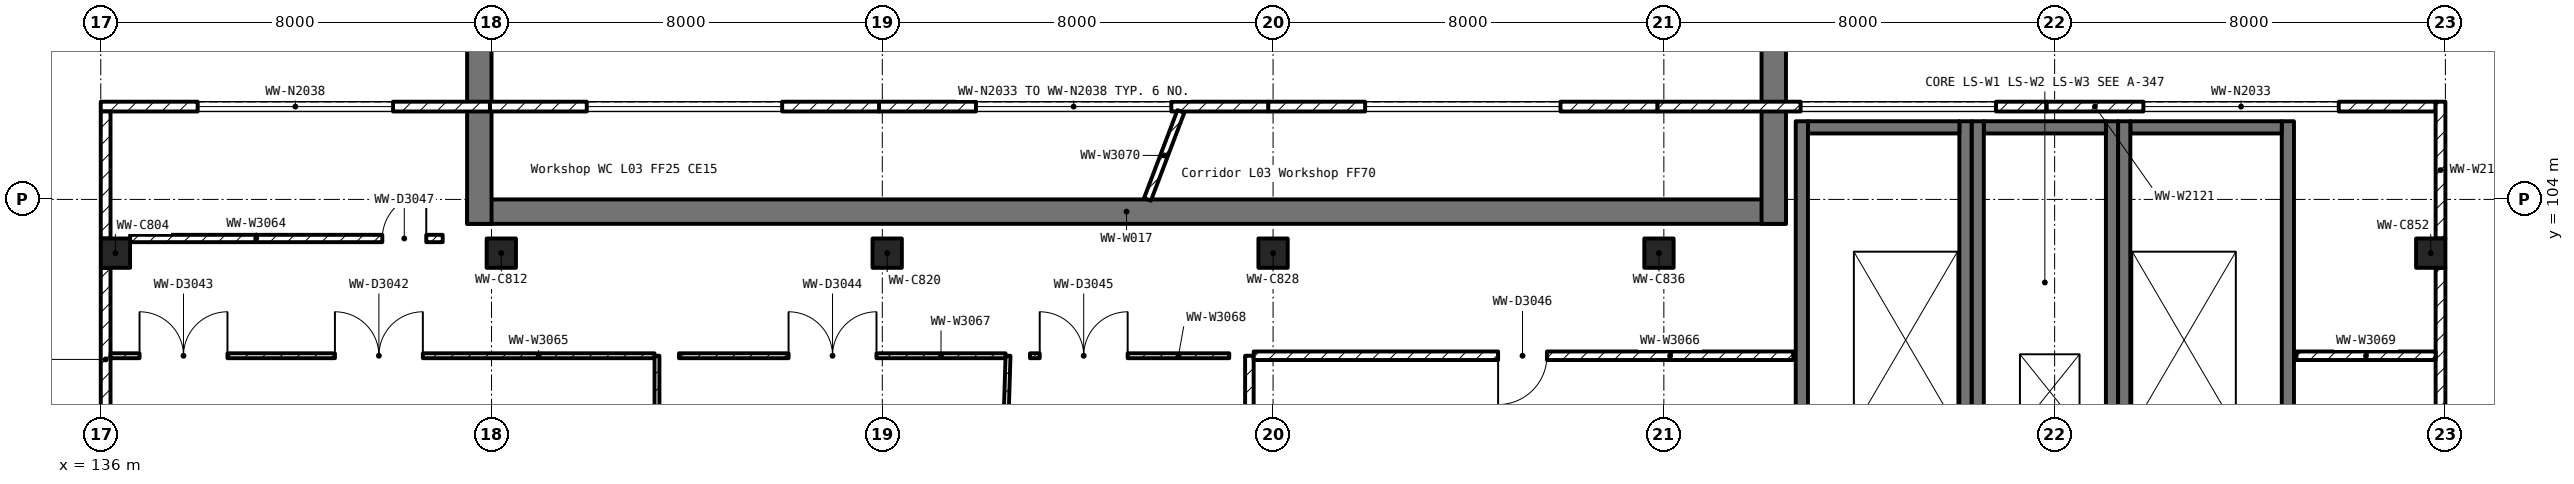
"""IFC4 building model, lengths in metres.
Left out: names, types, materials, properties, quantities, classifications, styles, units other than length and angle.
Written with IfcOpenShell. Run it as: python <this file> out.ifc"""

import sys

from ifc_helpers import new_model, si_unit, direction, frame, frame_2d, origin, origin_2d, place, context, subcontext, project, spatial, rectangle, extrude, element, fill, save


model = new_model("IFC4")
c1 = context("Model", 3, precision=1e-05, world=origin(), true_north=direction((0.0, 1.0)))
c2 = subcontext(c1, "Body", "Model", "MODEL_VIEW")
j1 = project(units=[si_unit("LENGTHUNIT", "METRE"), si_unit("PLANEANGLEUNIT", "RADIAN")], contexts=[c1])
p1 = place(None, origin())
s1 = spatial("IfcSite", under=j1, at=p1, CompositionType="ELEMENT")
p2 = place(p1, origin())
s2 = spatial("IfcBuilding", under=s1, at=p2, CompositionType="ELEMENT")
p3 = place(p2, frame((0.0, 0.0, 17.0)))
s3 = spatial("IfcBuildingStorey", under=s2, at=p3, CompositionType="ELEMENT", Elevation=17.0)
for number, where, z_axis, x_axis in (
    (1, (136.3, 102.9, 0.0), (0.0, 0.0, 1.0), (1.0, 0.0, 0.0)),
    (2, (144.2, 102.9, 0.0), (0.0, 0.0, 1.0), (1.0, 0.0, 0.0)),
    (3, (152.1, 102.9, 0.0), (0.0, 0.0, 1.0), (1.0, 0.0, 0.0)),
    (4, (160.0, 102.9, 0.0), (0.0, 0.0, 1.0), (1.0, 0.0, 0.0)),
    (5, (167.9, 102.9, 0.0), (0.0, 0.0, 1.0), (1.0, 0.0, 0.0)),
    (6, (183.7, 102.9, 0.0), (0.0, 0.0, 1.0), (1.0, 0.0, 0.0)),
):
    element("IfcColumn", number, at=place(p3, frame(where, z_axis=z_axis, x_axis=x_axis)), inside=s3, PredefinedType="COLUMN", context=c2, shape_type="SweptSolid", body=[
        extrude(rectangle(XDim=0.6, YDim=0.6, at=origin_2d()), origin(), (0.0, 0.0, 1.0), 5.5),
    ])
p4 = place(p3, frame((143.5, 103.75, 0.0), z_axis=(0.0, 0.0, 1.0), x_axis=(1.0, 0.0, 0.0)))
e7 = element("IfcWall", 7, at=p4, inside=s3, PredefinedType="SHEAR", context=c2, shape_type="SweptSolid", body=[
    extrude(rectangle(XDim=27.0, YDim=0.5, at=frame_2d((13.5, 0.0))), origin(), (0.0, 0.0, 1.0), 5.5),
])
for number, where, z_axis, x_axis in (
    (8, (143.75, 103.5, 0.0), (0.0, 0.0, 1.0), (0.0, 1.0, 0.0)),
    (9, (170.25, 103.5, 0.0), (0.0, 0.0, 1.0), (0.0, 1.0, 0.0)),
):
    element("IfcWall", number, at=place(p3, frame(where, z_axis=z_axis, x_axis=x_axis)), inside=s3, PredefinedType="SHEAR", context=c2, shape_type="SweptSolid", body=[
        extrude(rectangle(XDim=25.0, YDim=0.5, at=frame_2d((12.5, 0.0))), origin(), (0.0, 0.0, 1.0), 5.5),
    ])
p5 = place(p3, frame((183.8, 105.9, 0.0), z_axis=(0.0, 0.0, 1.0), x_axis=(-1.0, 0.0, 0.0)))
e10 = element("IfcWall", 10, at=p5, inside=s3, PredefinedType="SOLIDWALL", context=c2, shape_type="SweptSolid", body=[
    extrude(rectangle(XDim=7.967, YDim=0.2, at=frame_2d((3.983, 0.0))), origin(), (0.0, 0.0, 1.0), 5.25),
])
p6 = place(p5, frame((1.983, 0.0, 1.0)))
e11 = element("IfcOpeningElement", 11, at=p6, cuts=e10, PredefinedType="OPENING", context=c2, shape_type="SweptSolid", body=[
    extrude(rectangle(XDim=4.0, YDim=1.8, at=frame_2d((2.0, 0.9))), frame((0.0, 0.112, 0.0), z_axis=(0.0, -1.0, 0.0), x_axis=(1.0, 0.0, 0.0)), (0.0, 0.0, 1.0), 0.224),
])
p7 = place(p3, frame((175.833, 105.9, 0.0), z_axis=(0.0, 0.0, 1.0), x_axis=(-1.0, 0.0, 0.0)))
e12 = element("IfcWall", 12, at=p7, inside=s3, PredefinedType="SOLIDWALL", context=c2, shape_type="SweptSolid", body=[
    extrude(rectangle(XDim=7.966, YDim=0.2, at=frame_2d((3.983, 0.0))), origin(), (0.0, 0.0, 1.0), 5.25),
])
p8 = place(p7, frame((1.033, 0.0, 1.0)))
e13 = element("IfcOpeningElement", 13, at=p8, cuts=e12, PredefinedType="OPENING", context=c2, shape_type="SweptSolid", body=[
    extrude(rectangle(XDim=4.0, YDim=1.8, at=frame_2d((2.0, 0.9))), frame((0.0, 0.112, 0.0), z_axis=(0.0, -1.0, 0.0), x_axis=(1.0, 0.0, 0.0)), (0.0, 0.0, 1.0), 0.224),
])
p9 = place(p3, frame((167.867, 105.9, 0.0), z_axis=(0.0, 0.0, 1.0), x_axis=(-1.0, 0.0, 0.0)))
e14 = element("IfcWall", 14, at=p9, inside=s3, PredefinedType="SOLIDWALL", context=c2, shape_type="SweptSolid", body=[
    extrude(rectangle(XDim=7.967, YDim=0.2, at=frame_2d((3.983, 0.0))), origin(), (0.0, 0.0, 1.0), 4.9),
])
p10 = place(p9, frame((1.983, 0.0, 1.0)))
e15 = element("IfcOpeningElement", 15, at=p10, cuts=e14, PredefinedType="OPENING", context=c2, shape_type="SweptSolid", body=[
    extrude(rectangle(XDim=4.0, YDim=1.8, at=frame_2d((2.0, 0.9))), frame((0.0, 0.112, 0.0), z_axis=(0.0, -1.0, 0.0), x_axis=(1.0, 0.0, 0.0)), (0.0, 0.0, 1.0), 0.224),
])
p11 = place(p3, frame((159.9, 105.9, 0.0), z_axis=(0.0, 0.0, 1.0), x_axis=(-1.0, 0.0, 0.0)))
e16 = element("IfcWall", 16, at=p11, inside=s3, PredefinedType="SOLIDWALL", context=c2, shape_type="SweptSolid", body=[
    extrude(rectangle(XDim=7.967, YDim=0.2, at=frame_2d((3.983, 0.0))), origin(), (0.0, 0.0, 1.0), 4.9),
])
p12 = place(p11, frame((1.983, 0.0, 1.0)))
e17 = element("IfcOpeningElement", 17, at=p12, cuts=e16, PredefinedType="OPENING", context=c2, shape_type="SweptSolid", body=[
    extrude(rectangle(XDim=4.0, YDim=1.8, at=frame_2d((2.0, 0.9))), frame((0.0, 0.112, 0.0), z_axis=(0.0, -1.0, 0.0), x_axis=(1.0, 0.0, 0.0)), (0.0, 0.0, 1.0), 0.224),
])
p13 = place(p3, frame((151.933, 105.9, 0.0), z_axis=(0.0, 0.0, 1.0), x_axis=(-1.0, 0.0, 0.0)))
e18 = element("IfcWall", 18, at=p13, inside=s3, PredefinedType="SOLIDWALL", context=c2, shape_type="SweptSolid", body=[
    extrude(rectangle(XDim=7.966, YDim=0.2, at=frame_2d((3.983, 0.0))), origin(), (0.0, 0.0, 1.0), 4.9),
])
p14 = place(p13, frame((1.983, 0.0, 1.0)))
e19 = element("IfcOpeningElement", 19, at=p14, cuts=e18, PredefinedType="OPENING", context=c2, shape_type="SweptSolid", body=[
    extrude(rectangle(XDim=4.0, YDim=1.8, at=frame_2d((2.0, 0.9))), frame((0.0, 0.112, 0.0), z_axis=(0.0, -1.0, 0.0), x_axis=(1.0, 0.0, 0.0)), (0.0, 0.0, 1.0), 0.224),
])
p15 = place(p3, frame((143.967, 105.9, 0.0), z_axis=(0.0, 0.0, 1.0), x_axis=(-1.0, 0.0, 0.0)))
e20 = element("IfcWall", 20, at=p15, inside=s3, PredefinedType="SOLIDWALL", context=c2, shape_type="SweptSolid", body=[
    extrude(rectangle(XDim=7.967, YDim=0.2, at=frame_2d((3.983, 0.0))), origin(), (0.0, 0.0, 1.0), 5.25),
])
p16 = place(p15, frame((1.983, 0.0, 1.0)))
e21 = element("IfcOpeningElement", 21, at=p16, cuts=e20, PredefinedType="OPENING", context=c2, shape_type="SweptSolid", body=[
    extrude(rectangle(XDim=4.0, YDim=1.8, at=frame_2d((2.0, 0.9))), frame((0.0, 0.112, 0.0), z_axis=(0.0, -1.0, 0.0), x_axis=(1.0, 0.0, 0.0)), (0.0, 0.0, 1.0), 0.224),
])
p17 = place(p3, frame((136.1, 105.8, 0.0), z_axis=(0.0, 0.0, 1.0), x_axis=(0.0, -1.0, 0.0)))
e22 = element("IfcWall", 22, at=p17, inside=s3, PredefinedType="SOLIDWALL", context=c2, shape_type="SweptSolid", body=[
    extrude(rectangle(XDim=2.6, YDim=0.2, at=frame_2d((1.3, 0.0))), origin(), (0.0, 0.0, 1.0), 4.45),
])
p18 = place(p3, frame((136.1, 102.6, 0.0), z_axis=(0.0, 0.0, 1.0), x_axis=(0.0, -1.0, 0.0)))
e23 = element("IfcWall", 23, at=p18, inside=s3, PredefinedType="SOLIDWALL", context=c2, shape_type="SweptSolid", body=[
    extrude(rectangle(XDim=3.75, YDim=0.2, at=frame_2d((1.875, 0.0))), origin(), (0.0, 0.0, 1.0), 4.45),
])
p19 = place(p3, frame((183.9, 99.05, 0.0), z_axis=(0.0, 0.0, 1.0), x_axis=(0.0, 1.0, 0.0)))
e24 = element("IfcWall", 24, at=p19, inside=s3, PredefinedType="SOLIDWALL", context=c2, shape_type="SweptSolid", body=[
    extrude(rectangle(XDim=3.55, YDim=0.2, at=frame_2d((1.775, 0.0))), origin(), (0.0, 0.0, 1.0), 4.45),
])
p20 = place(p3, frame((183.9, 103.2, 0.0), z_axis=(0.0, 0.0, 1.0), x_axis=(0.0, 1.0, 0.0)))
e25 = element("IfcWall", 25, at=p20, inside=s3, PredefinedType="SOLIDWALL", context=c2, shape_type="SweptSolid", body=[
    extrude(rectangle(XDim=2.8, YDim=0.2, at=frame_2d((1.4, 0.0))), origin(), (0.0, 0.0, 1.0), 4.45),
])
for number, where, z_axis, x_axis in (
    (26, (183.85, 106.32, 0.0), (0.0, 0.0, 1.0), (0.0, 1.0, 0.0)),
    (27, (136.15, 113.44, 0.0), (0.0, 0.0, 1.0), (0.0, -1.0, 0.0)),
):
    element("IfcWall", number, at=place(p3, frame(where, z_axis=z_axis, x_axis=x_axis)), inside=s3, PredefinedType="PARAPET", context=c2, shape_type="SweptSolid", body=[
        extrude(rectangle(XDim=7.42, YDim=0.3, at=frame_2d((3.71, 0.0))), origin(), (0.0, 0.0, 1.0), 1.1),
    ])
p21 = place(p3, frame((177.175, 99.0, 0.0), z_axis=(0.0, 0.0, 1.0), x_axis=(0.0, 1.0, 0.0)))
e28 = element("IfcWall", 28, at=p21, inside=s3, PredefinedType="SOLIDWALL", context=c2, shape_type="SweptSolid", body=[
    extrude(rectangle(XDim=6.6, YDim=0.25, at=frame_2d((3.3, 0.0))), origin(), (0.0, 0.0, 1.0), 5.25),
])
p22 = place(p3, frame((177.05, 105.475, 0.0), z_axis=(0.0, 0.0, 1.0), x_axis=(-1.0, 0.0, 0.0)))
e29 = element("IfcWall", 29, at=p22, inside=s3, PredefinedType="SOLIDWALL", context=c2, shape_type="SweptSolid", body=[
    extrude(rectangle(XDim=2.5, YDim=0.25, at=frame_2d((1.25, 0.0))), origin(), (0.0, 0.0, 1.0), 5.25),
])
for number, where, z_axis, x_axis in (
    (30, (174.425, 105.6, 0.0), (0.0, 0.0, 1.0), (0.0, -1.0, 0.0)),
    (31, (174.175, 99.0, 0.0), (0.0, 0.0, 1.0), (0.0, 1.0, 0.0)),
):
    element("IfcWall", number, at=place(p3, frame(where, z_axis=z_axis, x_axis=x_axis)), inside=s3, PredefinedType="SOLIDWALL", context=c2, shape_type="SweptSolid", body=[
        extrude(rectangle(XDim=6.6, YDim=0.25, at=frame_2d((3.3, 0.0))), origin(), (0.0, 0.0, 1.0), 5.25),
    ])
p23 = place(p3, frame((174.05, 105.475, 0.0), z_axis=(0.0, 0.0, 1.0), x_axis=(-1.0, 0.0, 0.0)))
e32 = element("IfcWall", 32, at=p23, inside=s3, PredefinedType="SOLIDWALL", context=c2, shape_type="SweptSolid", body=[
    extrude(rectangle(XDim=3.1, YDim=0.25, at=frame_2d((1.55, 0.0))), origin(), (0.0, 0.0, 1.0), 5.25),
])
for number, where, z_axis, x_axis in (
    (33, (170.825, 105.6, 0.0), (0.0, 0.0, 1.0), (0.0, -1.0, 0.0)),
    (34, (180.775, 99.0, 0.0), (0.0, 0.0, 1.0), (0.0, 1.0, 0.0)),
):
    element("IfcWall", number, at=place(p3, frame(where, z_axis=z_axis, x_axis=x_axis)), inside=s3, PredefinedType="SOLIDWALL", context=c2, shape_type="SweptSolid", body=[
        extrude(rectangle(XDim=6.6, YDim=0.25, at=frame_2d((3.3, 0.0))), origin(), (0.0, 0.0, 1.0), 5.25),
    ])
p24 = place(p3, frame((180.65, 105.475, 0.0), z_axis=(0.0, 0.0, 1.0), x_axis=(-1.0, 0.0, 0.0)))
e35 = element("IfcWall", 35, at=p24, inside=s3, PredefinedType="SOLIDWALL", context=c2, shape_type="SweptSolid", body=[
    extrude(rectangle(XDim=3.1, YDim=0.25, at=frame_2d((1.55, 0.0))), origin(), (0.0, 0.0, 1.0), 5.25),
])
p25 = place(p3, frame((177.425, 105.6, 0.0), z_axis=(0.0, 0.0, 1.0), x_axis=(0.0, -1.0, 0.0)))
e36 = element("IfcWall", 36, at=p25, inside=s3, PredefinedType="SOLIDWALL", context=c2, shape_type="SweptSolid", body=[
    extrude(rectangle(XDim=6.6, YDim=0.25, at=frame_2d((3.3, 0.0))), origin(), (0.0, 0.0, 1.0), 5.25),
])
p26 = place(p3, frame((147.387, 100.8, 0.0), z_axis=(0.0, 0.0, 1.0), x_axis=(0.0, -1.0, 0.0)))
e37 = element("IfcWall", 37, at=p26, inside=s3, PredefinedType="PARTITIONING", context=c2, shape_type="SweptSolid", body=[
    extrude(rectangle(XDim=22.6, YDim=0.1, at=frame_2d((11.3, 0.0))), origin(), (0.0, 0.0, 1.0), 4.35),
])
p27 = place(p3, frame((154.574, 100.8, 0.0), z_axis=(0.0, 0.0, 1.0), x_axis=(-0.030697419898, -0.999528723155, 0.0)))
e38 = element("IfcWall", 38, at=p27, inside=s3, PredefinedType="PARTITIONING", context=c2, shape_type="SweptSolid", body=[
    extrude(rectangle(XDim=22.611, YDim=0.1, at=frame_2d((11.305, 0.0))), origin(), (0.0, 0.0, 1.0), 4.35),
])
p28 = place(p3, frame((159.515, 100.8, 0.0), z_axis=(0.0, 0.0, 1.0), x_axis=(0.0, -1.0, 0.0)))
e39 = element("IfcWall", 39, at=p28, inside=s3, PredefinedType="PARTITIONING", context=c2, shape_type="SweptSolid", body=[
    extrude(rectangle(XDim=22.6, YDim=0.175, at=frame_2d((11.3, 0.0))), origin(), (0.0, 0.0, 1.0), 4.35),
])
p29 = place(p3, frame((136.601, 103.2, 0.0), z_axis=(0.0, 0.0, 1.0), x_axis=(1.0, 0.0, 0.0)))
e40 = element("IfcWall", 40, at=p29, inside=s3, PredefinedType="PARTITIONING", context=c2, shape_type="SweptSolid", body=[
    extrude(rectangle(XDim=6.399, YDim=0.15, at=frame_2d((3.199, 0.0))), origin(), (0.0, 0.0, 1.0), 4.0),
])
p30 = place(p29, frame((5.163, 0.0, 0.0)))
e41 = element("IfcOpeningElement", 41, at=p30, cuts=e40, PredefinedType="OPENING", context=c2, shape_type="SweptSolid", body=[
    extrude(rectangle(XDim=0.9, YDim=2.1, at=frame_2d((0.45, 1.05))), frame((0.0, 0.087, 0.0), z_axis=(0.0, -1.0, 0.0), x_axis=(1.0, 0.0, 0.0)), (0.0, 0.0, 1.0), 0.174),
])
p31 = place(p3, frame((136.2, 100.8, 0.0), z_axis=(0.0, 0.0, 1.0), x_axis=(1.0, 0.0, 0.0)))
e42 = element("IfcWall", 42, at=p31, inside=s3, PredefinedType="PARTITIONING", context=c2, shape_type="SweptSolid", body=[
    extrude(rectangle(XDim=11.137, YDim=0.1, at=frame_2d((5.568, 0.0))), origin(), (0.0, 0.0, 1.0), 4.0),
])
p32 = place(p31, frame((4.594, 0.0, 0.0)))
e43 = element("IfcOpeningElement", 43, at=p32, cuts=e42, PredefinedType="OPENING", context=c2, shape_type="SweptSolid", body=[
    extrude(rectangle(XDim=1.8, YDim=2.1, at=frame_2d((0.9, 1.05))), frame((0.0, 0.062, 0.0), z_axis=(0.0, -1.0, 0.0), x_axis=(1.0, 0.0, 0.0)), (0.0, 0.0, 1.0), 0.124),
])
p33 = place(p31, frame((0.594, 0.0, 0.0)))
e44 = element("IfcOpeningElement", 44, at=p33, cuts=e42, PredefinedType="OPENING", context=c2, shape_type="SweptSolid", body=[
    extrude(rectangle(XDim=1.8, YDim=2.1, at=frame_2d((0.9, 1.05))), frame((0.0, 0.062, 0.0), z_axis=(0.0, -1.0, 0.0), x_axis=(1.0, 0.0, 0.0)), (0.0, 0.0, 1.0), 0.124),
])
p34 = place(p3, frame((170.65, 100.8, 0.0), z_axis=(0.0, 0.0, 1.0), x_axis=(-1.0, 0.0, 0.0)))
e45 = element("IfcWall", 45, at=p34, inside=s3, PredefinedType="PARTITIONING", context=c2, shape_type="SweptSolid", body=[
    extrude(rectangle(XDim=11.047, YDim=0.175, at=frame_2d((5.523, 0.0))), origin(), (0.0, 0.0, 1.0), 4.0),
])
p35 = place(p34, frame((5.043, 0.0, 0.0)))
e46 = element("IfcOpeningElement", 46, at=p35, cuts=e45, PredefinedType="OPENING", context=c2, shape_type="SweptSolid", body=[
    extrude(rectangle(XDim=1.0, YDim=2.1, at=frame_2d((0.5, 1.05))), frame((0.0, 0.1, 0.0), z_axis=(0.0, -1.0, 0.0), x_axis=(1.0, 0.0, 0.0)), (0.0, 0.0, 1.0), 0.199),
])
p36 = place(p3, frame((147.837, 100.8, 0.0), z_axis=(0.0, 0.0, 1.0), x_axis=(1.0, 0.0, 0.0)))
e47 = element("IfcWall", 47, at=p36, inside=s3, PredefinedType="PARTITIONING", context=c2, shape_type="SweptSolid", body=[
    extrude(rectangle(XDim=6.686, YDim=0.1, at=frame_2d((3.343, 0.0))), origin(), (0.0, 0.0, 1.0), 4.0),
])
p37 = place(p36, frame((2.244, 0.0, 0.0)))
e48 = element("IfcOpeningElement", 48, at=p37, cuts=e47, PredefinedType="OPENING", context=c2, shape_type="SweptSolid", body=[
    extrude(rectangle(XDim=1.8, YDim=2.1, at=frame_2d((0.9, 1.05))), frame((0.0, 0.062, 0.0), z_axis=(0.0, -1.0, 0.0), x_axis=(1.0, 0.0, 0.0)), (0.0, 0.0, 1.0), 0.124),
])
p38 = place(p3, frame((155.023, 100.8, 0.0), z_axis=(0.0, 0.0, 1.0), x_axis=(1.0, 0.0, 0.0)))
e49 = element("IfcWall", 49, at=p38, inside=s3, PredefinedType="PARTITIONING", context=c2, shape_type="SweptSolid", body=[
    extrude(rectangle(XDim=4.08, YDim=0.1, at=frame_2d((2.04, 0.0))), origin(), (0.0, 0.0, 1.0), 4.0),
])
p39 = place(p38, frame((0.2, 0.0, 0.0)))
e50 = element("IfcOpeningElement", 50, at=p39, cuts=e49, PredefinedType="OPENING", context=c2, shape_type="SweptSolid", body=[
    extrude(rectangle(XDim=1.8, YDim=2.1, at=frame_2d((0.9, 1.05))), frame((0.0, 0.062, 0.0), z_axis=(0.0, -1.0, 0.0), x_axis=(1.0, 0.0, 0.0)), (0.0, 0.0, 1.0), 0.124),
])
p40 = place(p3, frame((183.8, 100.8, 0.0), z_axis=(0.0, 0.0, 1.0), x_axis=(-1.0, 0.0, 0.0)))
e51 = element("IfcWall", 51, at=p40, inside=s3, PredefinedType="PARTITIONING", context=c2, shape_type="SweptSolid", body=[
    extrude(rectangle(XDim=2.85, YDim=0.175, at=frame_2d((1.425, 0.0))), origin(), (0.0, 0.0, 1.0), 4.0),
])
p41 = place(p3, frame((157.429, 104.001, 0.0), z_axis=(0.0, 0.0, 1.0), x_axis=(0.354971642951, 0.934877068229, 0.0)))
e52 = element("IfcWall", 52, at=p41, inside=s3, PredefinedType="PARTITIONING", context=c2, shape_type="SweptSolid", body=[
    extrude(rectangle(XDim=1.924, YDim=0.15, at=frame_2d((0.962, 0.0))), origin(), (0.0, 0.0, 1.0), 4.0),
])
p42 = place(p6, origin())
e53 = element("IfcWindow", 53, at=p42, inside=s3, PartitioningType="DOUBLE_PANEL_VERTICAL", PredefinedType="WINDOW", context=c2, shape_type="SweptSolid", body=[
    extrude(rectangle(XDim=4.0, YDim=1.8, at=frame_2d((2.0, 0.9))), frame((0.0, 0.03, 0.0), z_axis=(0.0, -1.0, 0.0), x_axis=(1.0, 0.0, 0.0)), (0.0, 0.0, 1.0), 0.06),
])
fill(e11, e53)
p43 = place(p8, origin())
e54 = element("IfcWindow", 54, at=p43, inside=s3, PartitioningType="DOUBLE_PANEL_VERTICAL", PredefinedType="WINDOW", context=c2, shape_type="SweptSolid", body=[
    extrude(rectangle(XDim=4.0, YDim=1.8, at=frame_2d((2.0, 0.9))), frame((0.0, 0.03, 0.0), z_axis=(0.0, -1.0, 0.0), x_axis=(1.0, 0.0, 0.0)), (0.0, 0.0, 1.0), 0.06),
])
fill(e13, e54)
p44 = place(p10, origin())
e55 = element("IfcWindow", 55, at=p44, inside=s3, PartitioningType="DOUBLE_PANEL_VERTICAL", PredefinedType="WINDOW", context=c2, shape_type="SweptSolid", body=[
    extrude(rectangle(XDim=4.0, YDim=1.8, at=frame_2d((2.0, 0.9))), frame((0.0, 0.03, 0.0), z_axis=(0.0, -1.0, 0.0), x_axis=(1.0, 0.0, 0.0)), (0.0, 0.0, 1.0), 0.06),
])
fill(e15, e55)
p45 = place(p12, origin())
e56 = element("IfcWindow", 56, at=p45, inside=s3, PartitioningType="DOUBLE_PANEL_VERTICAL", PredefinedType="WINDOW", context=c2, shape_type="SweptSolid", body=[
    extrude(rectangle(XDim=4.0, YDim=1.8, at=frame_2d((2.0, 0.9))), frame((0.0, 0.03, 0.0), z_axis=(0.0, -1.0, 0.0), x_axis=(1.0, 0.0, 0.0)), (0.0, 0.0, 1.0), 0.06),
])
fill(e17, e56)
p46 = place(p14, origin())
e57 = element("IfcWindow", 57, at=p46, inside=s3, PartitioningType="DOUBLE_PANEL_VERTICAL", PredefinedType="WINDOW", context=c2, shape_type="SweptSolid", body=[
    extrude(rectangle(XDim=4.0, YDim=1.8, at=frame_2d((2.0, 0.9))), frame((0.0, 0.03, 0.0), z_axis=(0.0, -1.0, 0.0), x_axis=(1.0, 0.0, 0.0)), (0.0, 0.0, 1.0), 0.06),
])
fill(e19, e57)
p47 = place(p16, origin())
e58 = element("IfcWindow", 58, at=p47, inside=s3, PartitioningType="DOUBLE_PANEL_VERTICAL", PredefinedType="WINDOW", context=c2, shape_type="SweptSolid", body=[
    extrude(rectangle(XDim=4.0, YDim=1.8, at=frame_2d((2.0, 0.9))), frame((0.0, 0.03, 0.0), z_axis=(0.0, -1.0, 0.0), x_axis=(1.0, 0.0, 0.0)), (0.0, 0.0, 1.0), 0.06),
])
fill(e21, e58)
p48 = place(p32, origin())
e59 = element("IfcDoor", 59, at=p48, inside=s3, OperationType="DOUBLE_DOOR_SINGLE_SWING", PredefinedType="DOOR", context=c2, shape_type="SweptSolid", body=[
    extrude(rectangle(XDim=1.8, YDim=2.1, at=frame_2d((0.9, 1.05))), frame((0.0, 0.025, 0.0), z_axis=(0.0, -1.0, 0.0), x_axis=(1.0, 0.0, 0.0)), (0.0, 0.0, 1.0), 0.05),
])
fill(e43, e59)
p49 = place(p33, origin())
e60 = element("IfcDoor", 60, at=p49, inside=s3, OperationType="DOUBLE_DOOR_SINGLE_SWING", PredefinedType="DOOR", context=c2, shape_type="SweptSolid", body=[
    extrude(rectangle(XDim=1.8, YDim=2.1, at=frame_2d((0.9, 1.05))), frame((0.0, 0.025, 0.0), z_axis=(0.0, -1.0, 0.0), x_axis=(1.0, 0.0, 0.0)), (0.0, 0.0, 1.0), 0.05),
])
fill(e44, e60)
p50 = place(p37, origin())
e61 = element("IfcDoor", 61, at=p50, inside=s3, OperationType="DOUBLE_DOOR_SINGLE_SWING", PredefinedType="DOOR", context=c2, shape_type="SweptSolid", body=[
    extrude(rectangle(XDim=1.8, YDim=2.1, at=frame_2d((0.9, 1.05))), frame((0.0, 0.025, 0.0), z_axis=(0.0, -1.0, 0.0), x_axis=(1.0, 0.0, 0.0)), (0.0, 0.0, 1.0), 0.05),
])
fill(e48, e61)
p51 = place(p39, origin())
e62 = element("IfcDoor", 62, at=p51, inside=s3, OperationType="DOUBLE_DOOR_SINGLE_SWING", PredefinedType="DOOR", context=c2, shape_type="SweptSolid", body=[
    extrude(rectangle(XDim=1.8, YDim=2.1, at=frame_2d((0.9, 1.05))), frame((0.0, 0.025, 0.0), z_axis=(0.0, -1.0, 0.0), x_axis=(1.0, 0.0, 0.0)), (0.0, 0.0, 1.0), 0.05),
])
fill(e50, e62)
p52 = place(p35, origin())
e63 = element("IfcDoor", 63, at=p52, inside=s3, OperationType="SINGLE_SWING_RIGHT", PredefinedType="DOOR", context=c2, shape_type="SweptSolid", body=[
    extrude(rectangle(XDim=1.0, YDim=2.1, at=frame_2d((0.5, 1.05))), frame((0.0, 0.025, 0.0), z_axis=(0.0, -1.0, 0.0), x_axis=(1.0, 0.0, 0.0)), (0.0, 0.0, 1.0), 0.05),
])
fill(e46, e63)
p53 = place(p30, origin())
e64 = element("IfcDoor", 64, at=p53, inside=s3, OperationType="SINGLE_SWING_RIGHT", PredefinedType="DOOR", context=c2, shape_type="SweptSolid", body=[
    extrude(rectangle(XDim=0.9, YDim=2.1, at=frame_2d((0.45, 1.05))), frame((0.0, 0.025, 0.0), z_axis=(0.0, -1.0, 0.0), x_axis=(1.0, 0.0, 0.0)), (0.0, 0.0, 1.0), 0.05),
])
fill(e41, e64)
save(model, sys.argv[1])
